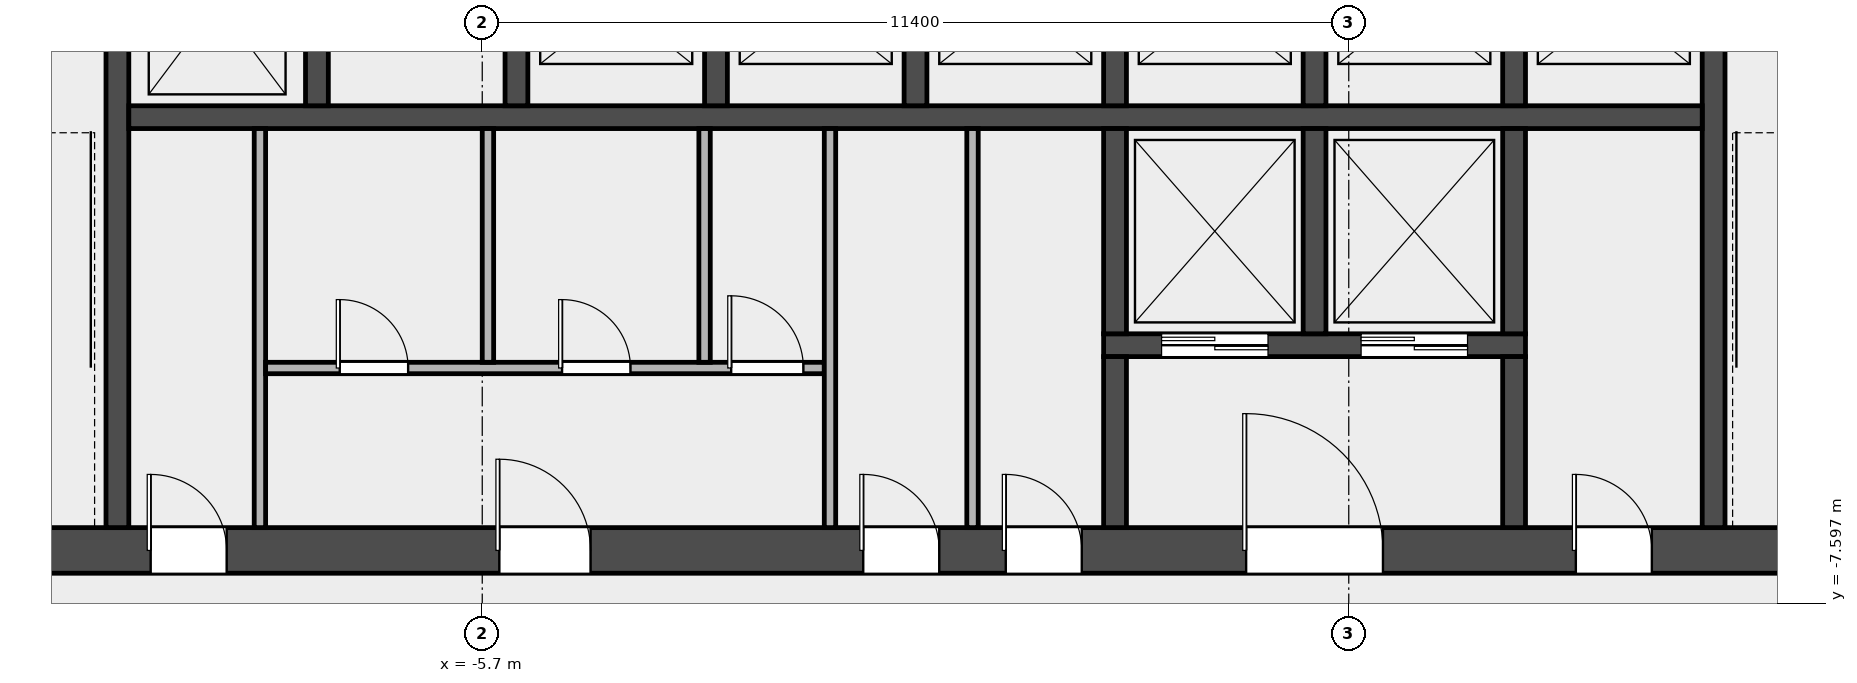
"""IFC4 building model, lengths in metres.
Left out: names, types, materials, properties, quantities, classifications, styles, units other than length and angle.
Written with IfcOpenShell. Run it as: python <this file> out.ifc"""

import sys

from ifc_helpers import new_model, si_unit, direction, frame, frame_2d, origin, place, context, subcontext, project, spatial, rectangle, extrude, element, fill, save


model = new_model("IFC4")
c1 = context("Model", 3, precision=1e-05, world=origin(), true_north=direction((0.0, 1.0)))
c2 = subcontext(c1, "Body", "Model", "MODEL_VIEW")
j1 = project(units=[si_unit("LENGTHUNIT", "METRE"), si_unit("PLANEANGLEUNIT", "RADIAN")], contexts=[c1])
p1 = place(None, origin())
s1 = spatial("IfcSite", under=j1, at=p1, CompositionType="ELEMENT")
p2 = place(p1, origin())
s2 = spatial("IfcBuilding", under=s1, at=p2, CompositionType="ELEMENT")
p3 = place(p2, frame((0.0, 0.0, 161.0)))
s3 = spatial("IfcBuildingStorey", under=s2, at=p3, CompositionType="ELEMENT", Elevation=161.0)
p4 = place(p3, frame((-14.4, -6.9, 0.0), z_axis=(0.0, 0.0, 1.0), x_axis=(1.0, 0.0, 0.0)))
e1 = element("IfcWall", 1, at=p4, inside=s3, PredefinedType="SHEAR", context=c2, shape_type="SweptSolid", body=[
    extrude(rectangle(XDim=28.8, YDim=0.6, at=frame_2d((14.4, 0.0))), origin(), (0.0, 0.0, 1.0), 3.7),
])
p5 = place(p4, frame((4.337, 0.0, 0.0)))
e2 = element("IfcOpeningElement", 2, at=p5, cuts=e1, PredefinedType="OPENING", context=c2, shape_type="SweptSolid", body=[
    extrude(rectangle(XDim=1.0, YDim=2.1, at=frame_2d((0.5, 1.05))), frame((0.0, 0.312, 0.0), z_axis=(0.0, -1.0, 0.0), x_axis=(1.0, 0.0, 0.0)), (0.0, 0.0, 1.0), 0.624),
])
p6 = place(p4, frame((8.925, 0.0, 0.0)))
e3 = element("IfcOpeningElement", 3, at=p6, cuts=e1, PredefinedType="OPENING", context=c2, shape_type="SweptSolid", body=[
    extrude(rectangle(XDim=1.2, YDim=2.1, at=frame_2d((0.6, 1.05))), frame((0.0, 0.312, 0.0), z_axis=(0.0, -1.0, 0.0), x_axis=(1.0, 0.0, 0.0)), (0.0, 0.0, 1.0), 0.624),
])
p7 = place(p4, frame((13.712, 0.0, 0.0)))
e4 = element("IfcOpeningElement", 4, at=p7, cuts=e1, PredefinedType="OPENING", context=c2, shape_type="SweptSolid", body=[
    extrude(rectangle(XDim=1.0, YDim=2.1, at=frame_2d((0.5, 1.05))), frame((0.0, 0.312, 0.0), z_axis=(0.0, -1.0, 0.0), x_axis=(1.0, 0.0, 0.0)), (0.0, 0.0, 1.0), 0.624),
])
p8 = place(p4, frame((15.587, 0.0, 0.0)))
e5 = element("IfcOpeningElement", 5, at=p8, cuts=e1, PredefinedType="OPENING", context=c2, shape_type="SweptSolid", body=[
    extrude(rectangle(XDim=1.0, YDim=2.1, at=frame_2d((0.5, 1.05))), frame((0.0, 0.312, 0.0), z_axis=(0.0, -1.0, 0.0), x_axis=(1.0, 0.0, 0.0)), (0.0, 0.0, 1.0), 0.624),
])
p9 = place(p4, frame((18.75, 0.0, 0.0)))
e6 = element("IfcOpeningElement", 6, at=p9, cuts=e1, PredefinedType="OPENING", context=c2, shape_type="SweptSolid", body=[
    extrude(rectangle(XDim=1.8, YDim=2.1, at=frame_2d((0.9, 1.05))), frame((0.0, 0.312, 0.0), z_axis=(0.0, -1.0, 0.0), x_axis=(1.0, 0.0, 0.0)), (0.0, 0.0, 1.0), 0.624),
])
p10 = place(p4, frame((23.087, 0.0, 0.0)))
e7 = element("IfcOpeningElement", 7, at=p10, cuts=e1, PredefinedType="OPENING", context=c2, shape_type="SweptSolid", body=[
    extrude(rectangle(XDim=1.0, YDim=2.1, at=frame_2d((0.5, 1.05))), frame((0.0, 0.312, 0.0), z_axis=(0.0, -1.0, 0.0), x_axis=(1.0, 0.0, 0.0)), (0.0, 0.0, 1.0), 0.624),
])
for number, where, z_axis, x_axis in (
    (8, (-10.5, -6.6, 0.0), (0.0, 0.0, 1.0), (0.0, 1.0, 0.0)),
    (9, (10.5, -6.6, 0.0), (0.0, 0.0, 1.0), (0.0, 1.0, 0.0)),
):
    element("IfcWall", number, at=place(p3, frame(where, z_axis=z_axis, x_axis=x_axis)), inside=s3, PredefinedType="SHEAR", context=c2, shape_type="SweptSolid", body=[
        extrude(rectangle(XDim=8.55, YDim=0.3, at=frame_2d((4.275, 0.0))), origin(), (0.0, 0.0, 1.0), 3.7),
    ])
p11 = place(p3, frame((-10.35, -1.2, 0.0), z_axis=(0.0, 0.0, 1.0), x_axis=(1.0, 0.0, 0.0)))
e10 = element("IfcWall", 10, at=p11, inside=s3, PredefinedType="SOLIDWALL", context=c2, shape_type="SweptSolid", body=[
    extrude(rectangle(XDim=20.7, YDim=0.3, at=frame_2d((10.35, 0.0))), origin(), (0.0, 0.0, 1.0), 3.7),
])
for number, where, z_axis, x_axis in (
    (11, (-7.875, -1.05, 0.0), (0.0, 0.0, 1.0), (0.0, 1.0, 0.0)),
    (12, (-5.25, -1.05, 0.0), (0.0, 0.0, 1.0), (0.0, 1.0, 0.0)),
    (13, (-2.625, -1.05, 0.0), (0.0, 0.0, 1.0), (0.0, 1.0, 0.0)),
    (14, (0.0, -1.05, 0.0), (0.0, 0.0, 1.0), (0.0, 1.0, 0.0)),
    (15, (2.625, -1.05, 0.0), (0.0, 0.0, 1.0), (0.0, 1.0, 0.0)),
    (16, (5.25, -1.05, 0.0), (0.0, 0.0, 1.0), (0.0, 1.0, 0.0)),
    (17, (7.875, -1.05, 0.0), (0.0, 0.0, 1.0), (0.0, 1.0, 0.0)),
):
    element("IfcWall", number, at=place(p3, frame(where, z_axis=z_axis, x_axis=x_axis)), inside=s3, PredefinedType="SOLIDWALL", context=c2, shape_type="SweptSolid", body=[
        extrude(rectangle(XDim=2.7, YDim=0.3, at=frame_2d((1.35, 0.0))), origin(), (0.0, 0.0, 1.0), 3.7),
    ])
p12 = place(p3, frame((2.475, -4.2, 0.0), z_axis=(0.0, 0.0, 1.0), x_axis=(1.0, 0.0, 0.0)))
e18 = element("IfcWall", 18, at=p12, inside=s3, PredefinedType="SOLIDWALL", context=c2, shape_type="SweptSolid", body=[
    extrude(rectangle(XDim=5.55, YDim=0.3, at=frame_2d((2.775, 0.0))), origin(), (0.0, 0.0, 1.0), 3.7),
])
p13 = place(p12, frame((0.762, 0.0, 0.0)))
e19 = element("IfcOpeningElement", 19, at=p13, cuts=e18, PredefinedType="OPENING", context=c2, shape_type="SweptSolid", body=[
    extrude(rectangle(XDim=1.4, YDim=2.1, at=frame_2d((0.7, 1.05))), frame((0.0, 0.162, 0.0), z_axis=(0.0, -1.0, 0.0), x_axis=(1.0, 0.0, 0.0)), (0.0, 0.0, 1.0), 0.324),
])
p14 = place(p12, frame((3.387, 0.0, 0.0)))
e20 = element("IfcOpeningElement", 20, at=p14, cuts=e18, PredefinedType="OPENING", context=c2, shape_type="SweptSolid", body=[
    extrude(rectangle(XDim=1.4, YDim=2.1, at=frame_2d((0.7, 1.05))), frame((0.0, 0.162, 0.0), z_axis=(0.0, -1.0, 0.0), x_axis=(1.0, 0.0, 0.0)), (0.0, 0.0, 1.0), 0.324),
])
p15 = place(p3, frame((2.625, -4.05, 0.0), z_axis=(0.0, 0.0, 1.0), x_axis=(0.0, 1.0, 0.0)))
e21 = element("IfcWall", 21, at=p15, inside=s3, PredefinedType="SOLIDWALL", context=c2, shape_type="SweptSolid", body=[
    extrude(rectangle(XDim=2.7, YDim=0.3, at=frame_2d((1.35, 0.0))), origin(), (0.0, 0.0, 1.0), 3.7),
])
p16 = place(p3, frame((2.625, -6.6, 0.0), z_axis=(0.0, 0.0, 1.0), x_axis=(0.0, 1.0, 0.0)))
e22 = element("IfcWall", 22, at=p16, inside=s3, PredefinedType="SOLIDWALL", context=c2, shape_type="SweptSolid", body=[
    extrude(rectangle(XDim=2.25, YDim=0.3, at=frame_2d((1.125, 0.0))), origin(), (0.0, 0.0, 1.0), 3.7),
])
for number, where, z_axis, x_axis in (
    (23, (5.25, -4.05, 0.0), (0.0, 0.0, 1.0), (0.0, 1.0, 0.0)),
    (24, (7.875, -4.05, 0.0), (0.0, 0.0, 1.0), (0.0, 1.0, 0.0)),
):
    element("IfcWall", number, at=place(p3, frame(where, z_axis=z_axis, x_axis=x_axis)), inside=s3, PredefinedType="SOLIDWALL", context=c2, shape_type="SweptSolid", body=[
        extrude(rectangle(XDim=2.7, YDim=0.3, at=frame_2d((1.35, 0.0))), origin(), (0.0, 0.0, 1.0), 3.7),
    ])
p17 = place(p3, frame((7.875, -6.6, 0.0), z_axis=(0.0, 0.0, 1.0), x_axis=(0.0, 1.0, 0.0)))
e25 = element("IfcWall", 25, at=p17, inside=s3, PredefinedType="SOLIDWALL", context=c2, shape_type="SweptSolid", body=[
    extrude(rectangle(XDim=2.25, YDim=0.3, at=frame_2d((1.125, 0.0))), origin(), (0.0, 0.0, 1.0), 3.7),
])
p18 = place(p3, frame((-8.625, -6.6, 0.0), z_axis=(0.0, 0.0, 1.0), x_axis=(0.0, 1.0, 0.0)))
e26 = element("IfcWall", 26, at=p18, inside=s3, PredefinedType="PARTITIONING", context=c2, shape_type="SweptSolid", body=[
    extrude(rectangle(XDim=5.25, YDim=0.15, at=frame_2d((2.625, 0.0))), origin(), (0.0, 0.0, 1.0), 3.7),
])
p19 = place(p3, frame((-8.55, -4.5, 0.0), z_axis=(0.0, 0.0, 1.0), x_axis=(1.0, 0.0, 0.0)))
e27 = element("IfcWall", 27, at=p19, inside=s3, PredefinedType="PARTITIONING", context=c2, shape_type="SweptSolid", body=[
    extrude(rectangle(XDim=7.35, YDim=0.15, at=frame_2d((3.675, 0.0))), origin(), (0.0, 0.0, 1.0), 3.7),
])
p20 = place(p19, frame((0.975, 0.0, 0.0)))
e28 = element("IfcOpeningElement", 28, at=p20, cuts=e27, PredefinedType="OPENING", context=c2, shape_type="SweptSolid", body=[
    extrude(rectangle(XDim=0.9, YDim=2.1, at=frame_2d((0.45, 1.05))), frame((0.0, 0.087, 0.0), z_axis=(0.0, -1.0, 0.0), x_axis=(1.0, 0.0, 0.0)), (0.0, 0.0, 1.0), 0.174),
])
p21 = place(p19, frame((3.9, 0.0, 0.0)))
e29 = element("IfcOpeningElement", 29, at=p21, cuts=e27, PredefinedType="OPENING", context=c2, shape_type="SweptSolid", body=[
    extrude(rectangle(XDim=0.9, YDim=2.1, at=frame_2d((0.45, 1.05))), frame((0.0, 0.087, 0.0), z_axis=(0.0, -1.0, 0.0), x_axis=(1.0, 0.0, 0.0)), (0.0, 0.0, 1.0), 0.174),
])
p22 = place(p19, frame((6.125, 0.0, 0.0)))
e30 = element("IfcOpeningElement", 30, at=p22, cuts=e27, PredefinedType="OPENING", context=c2, shape_type="SweptSolid", body=[
    extrude(rectangle(XDim=0.95, YDim=2.1, at=frame_2d((0.475, 1.05))), frame((0.0, 0.087, 0.0), z_axis=(0.0, -1.0, 0.0), x_axis=(1.0, 0.0, 0.0)), (0.0, 0.0, 1.0), 0.174),
])
for number, where, z_axis, x_axis in (
    (31, (-5.625, -4.425, 0.0), (0.0, 0.0, 1.0), (0.0, 1.0, 0.0)),
    (32, (-2.775, -4.425, 0.0), (0.0, 0.0, 1.0), (0.0, 1.0, 0.0)),
):
    element("IfcWall", number, at=place(p3, frame(where, z_axis=z_axis, x_axis=x_axis)), inside=s3, PredefinedType="PARTITIONING", context=c2, shape_type="SweptSolid", body=[
        extrude(rectangle(XDim=3.075, YDim=0.15, at=frame_2d((1.538, 0.0))), origin(), (0.0, 0.0, 1.0), 3.7),
    ])
for number, where, z_axis, x_axis in (
    (33, (-1.125, -6.6, 0.0), (0.0, 0.0, 1.0), (0.0, 1.0, 0.0)),
    (34, (0.75, -6.6, 0.0), (0.0, 0.0, 1.0), (0.0, 1.0, 0.0)),
):
    element("IfcWall", number, at=place(p3, frame(where, z_axis=z_axis, x_axis=x_axis)), inside=s3, PredefinedType="PARTITIONING", context=c2, shape_type="SweptSolid", body=[
        extrude(rectangle(XDim=5.25, YDim=0.15, at=frame_2d((2.625, 0.0))), origin(), (0.0, 0.0, 1.0), 3.7),
    ])
p23 = place(p13, origin())
e35 = element("IfcDoor", 35, at=p23, inside=s3, OperationType="DOUBLE_DOOR_SLIDING", PredefinedType="DOOR", context=c2, shape_type="SweptSolid", body=[
    extrude(rectangle(XDim=1.4, YDim=2.1, at=frame_2d((0.7, 1.05))), frame((0.0, 0.025, 0.0), z_axis=(0.0, -1.0, 0.0), x_axis=(1.0, 0.0, 0.0)), (0.0, 0.0, 1.0), 0.05),
])
fill(e19, e35)
p24 = place(p14, origin())
e36 = element("IfcDoor", 36, at=p24, inside=s3, OperationType="DOUBLE_DOOR_SLIDING", PredefinedType="DOOR", context=c2, shape_type="SweptSolid", body=[
    extrude(rectangle(XDim=1.4, YDim=2.1, at=frame_2d((0.7, 1.05))), frame((0.0, 0.025, 0.0), z_axis=(0.0, -1.0, 0.0), x_axis=(1.0, 0.0, 0.0)), (0.0, 0.0, 1.0), 0.05),
])
fill(e20, e36)
p25 = place(p5, origin())
e37 = element("IfcDoor", 37, at=p25, inside=s3, OperationType="SINGLE_SWING_LEFT", PredefinedType="DOOR", context=c2, shape_type="SweptSolid", body=[
    extrude(rectangle(XDim=1.0, YDim=2.1, at=frame_2d((0.5, 1.05))), frame((0.0, 0.025, 0.0), z_axis=(0.0, -1.0, 0.0), x_axis=(1.0, 0.0, 0.0)), (0.0, 0.0, 1.0), 0.05),
])
fill(e2, e37)
p26 = place(p6, origin())
e38 = element("IfcDoor", 38, at=p26, inside=s3, OperationType="SINGLE_SWING_LEFT", PredefinedType="DOOR", context=c2, shape_type="SweptSolid", body=[
    extrude(rectangle(XDim=1.2, YDim=2.1, at=frame_2d((0.6, 1.05))), frame((0.0, 0.025, 0.0), z_axis=(0.0, -1.0, 0.0), x_axis=(1.0, 0.0, 0.0)), (0.0, 0.0, 1.0), 0.05),
])
fill(e3, e38)
p27 = place(p20, origin())
e39 = element("IfcDoor", 39, at=p27, inside=s3, OperationType="SINGLE_SWING_LEFT", PredefinedType="DOOR", context=c2, shape_type="SweptSolid", body=[
    extrude(rectangle(XDim=0.9, YDim=2.1, at=frame_2d((0.45, 1.05))), frame((0.0, 0.025, 0.0), z_axis=(0.0, -1.0, 0.0), x_axis=(1.0, 0.0, 0.0)), (0.0, 0.0, 1.0), 0.05),
])
fill(e28, e39)
p28 = place(p21, origin())
e40 = element("IfcDoor", 40, at=p28, inside=s3, OperationType="SINGLE_SWING_LEFT", PredefinedType="DOOR", context=c2, shape_type="SweptSolid", body=[
    extrude(rectangle(XDim=0.9, YDim=2.1, at=frame_2d((0.45, 1.05))), frame((0.0, 0.025, 0.0), z_axis=(0.0, -1.0, 0.0), x_axis=(1.0, 0.0, 0.0)), (0.0, 0.0, 1.0), 0.05),
])
fill(e29, e40)
p29 = place(p22, origin())
e41 = element("IfcDoor", 41, at=p29, inside=s3, OperationType="SINGLE_SWING_LEFT", PredefinedType="DOOR", context=c2, shape_type="SweptSolid", body=[
    extrude(rectangle(XDim=0.95, YDim=2.1, at=frame_2d((0.475, 1.05))), frame((0.0, 0.025, 0.0), z_axis=(0.0, -1.0, 0.0), x_axis=(1.0, 0.0, 0.0)), (0.0, 0.0, 1.0), 0.05),
])
fill(e30, e41)
p30 = place(p7, origin())
e42 = element("IfcDoor", 42, at=p30, inside=s3, OperationType="SINGLE_SWING_LEFT", PredefinedType="DOOR", context=c2, shape_type="SweptSolid", body=[
    extrude(rectangle(XDim=1.0, YDim=2.1, at=frame_2d((0.5, 1.05))), frame((0.0, 0.025, 0.0), z_axis=(0.0, -1.0, 0.0), x_axis=(1.0, 0.0, 0.0)), (0.0, 0.0, 1.0), 0.05),
])
fill(e4, e42)
p31 = place(p8, origin())
e43 = element("IfcDoor", 43, at=p31, inside=s3, OperationType="SINGLE_SWING_LEFT", PredefinedType="DOOR", context=c2, shape_type="SweptSolid", body=[
    extrude(rectangle(XDim=1.0, YDim=2.1, at=frame_2d((0.5, 1.05))), frame((0.0, 0.025, 0.0), z_axis=(0.0, -1.0, 0.0), x_axis=(1.0, 0.0, 0.0)), (0.0, 0.0, 1.0), 0.05),
])
fill(e5, e43)
p32 = place(p9, origin())
e44 = element("IfcDoor", 44, at=p32, inside=s3, OperationType="DOUBLE_DOOR_SINGLE_SWING", PredefinedType="DOOR", context=c2, shape_type="SweptSolid", body=[
    extrude(rectangle(XDim=1.8, YDim=2.1, at=frame_2d((0.9, 1.05))), frame((0.0, 0.025, 0.0), z_axis=(0.0, -1.0, 0.0), x_axis=(1.0, 0.0, 0.0)), (0.0, 0.0, 1.0), 0.05),
])
fill(e6, e44)
p33 = place(p10, origin())
e45 = element("IfcDoor", 45, at=p33, inside=s3, OperationType="SINGLE_SWING_LEFT", PredefinedType="DOOR", context=c2, shape_type="SweptSolid", body=[
    extrude(rectangle(XDim=1.0, YDim=2.1, at=frame_2d((0.5, 1.05))), frame((0.0, 0.025, 0.0), z_axis=(0.0, -1.0, 0.0), x_axis=(1.0, 0.0, 0.0)), (0.0, 0.0, 1.0), 0.05),
])
fill(e7, e45)
save(model, sys.argv[1])
